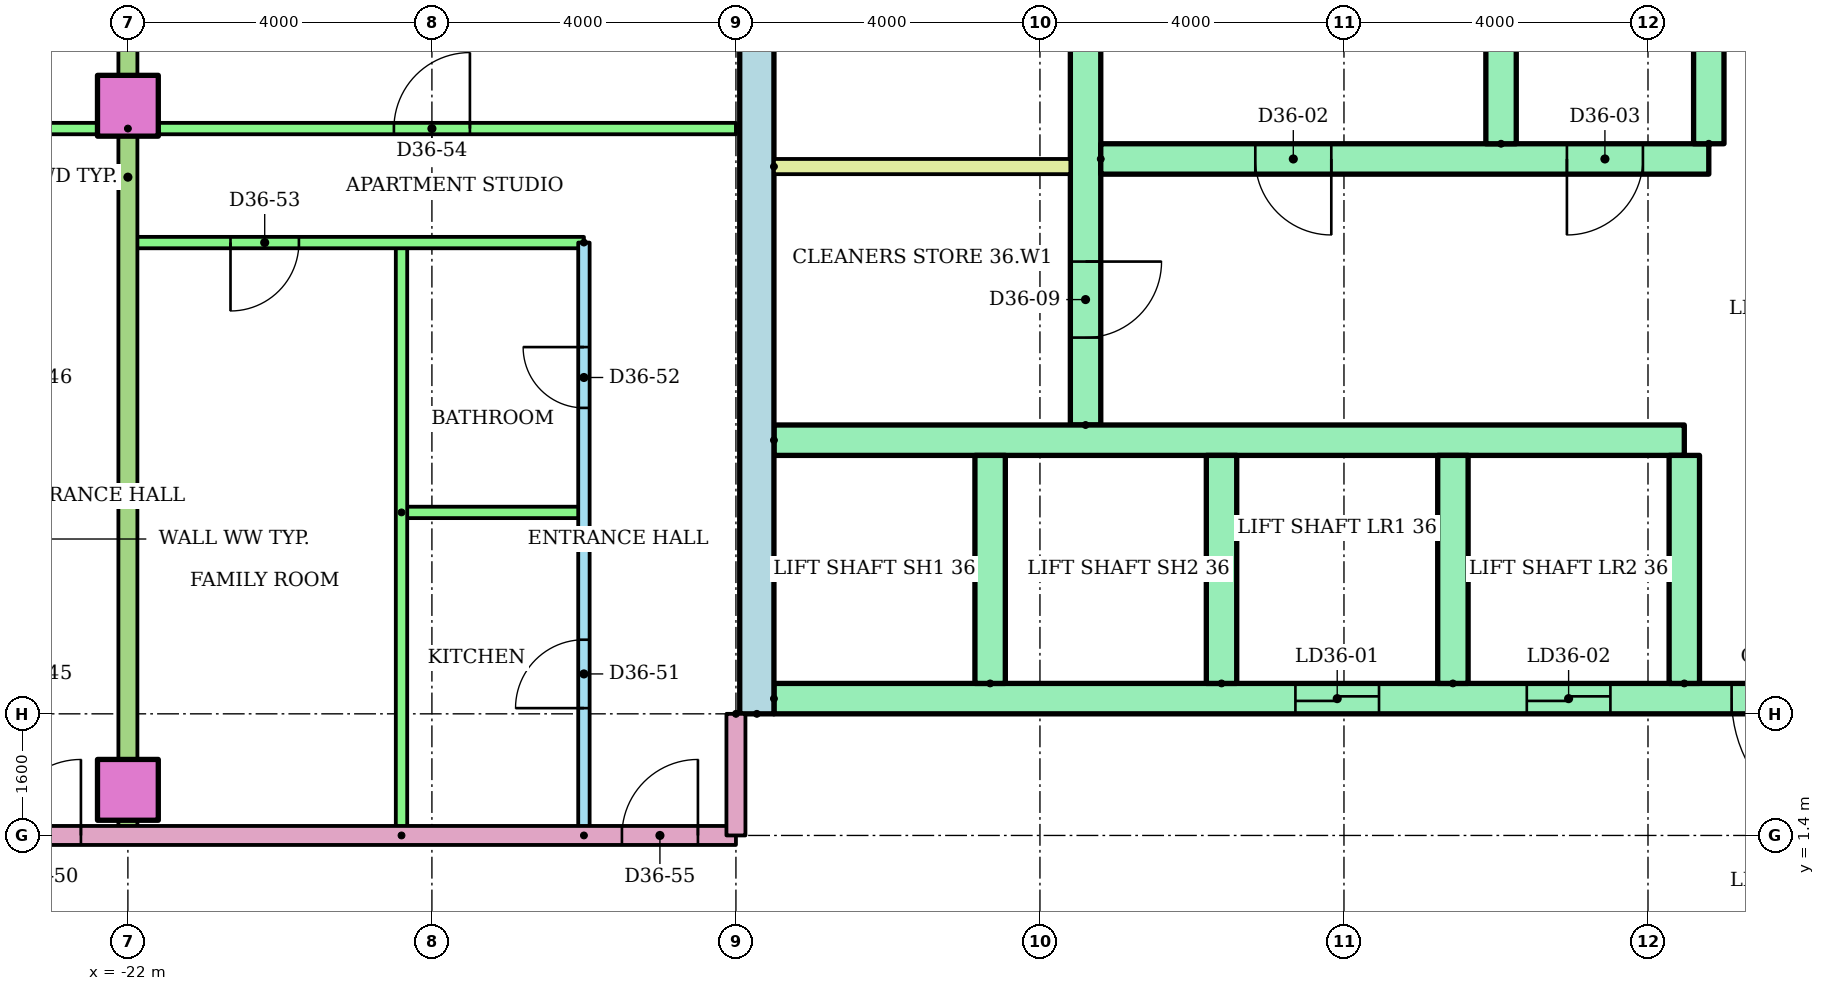
"""IFC4 building model, lengths in metres.
Left out: names, types, materials, properties, quantities, classifications, styles, units other than length and angle.
Written with IfcOpenShell. Run it as: python <this file> out.ifc"""

import sys

from ifc_helpers import new_model, si_unit, direction, frame, frame_2d, origin, origin_2d, place, context, subcontext, project, spatial, rectangle, extrude, element, fill, save


model = new_model("IFC4")
c1 = context("Model", 3, precision=1e-05, world=origin(), true_north=direction((0.0, 1.0)))
c2 = subcontext(c1, "Body", "Model", "MODEL_VIEW")
j1 = project(units=[si_unit("LENGTHUNIT", "METRE"), si_unit("PLANEANGLEUNIT", "RADIAN")], contexts=[c1])
p1 = place(None, origin())
s1 = spatial("IfcSite", under=j1, at=p1, CompositionType="ELEMENT")
p2 = place(p1, origin())
s2 = spatial("IfcBuilding", under=s1, at=p2, CompositionType="ELEMENT")
p3 = place(p2, frame((0.0, 0.0, 139.0)))
s3 = spatial("IfcBuildingStorey", under=s2, at=p3, CompositionType="ELEMENT", Elevation=139.0)
for number, where in (
    (1, (-22.0, 2.0, 0.0)),
    (2, (-22.0, 11.0, 0.0)),
):
    element("IfcColumn", number, at=place(p3, frame(where)), inside=s3, PredefinedType="COLUMN", context=c2, shape_type="SweptSolid", body=[
        extrude(rectangle(XDim=0.8, YDim=0.8, at=origin_2d()), origin(), (0.0, 0.0, 1.0), 3.2),
    ])
p4 = place(p3, frame((-13.725, 3.0, 0.0), z_axis=(0.0, 0.0, 1.0), x_axis=(0.0, 1.0, 0.0)))
e3 = element("IfcWall", 3, at=p4, inside=s3, PredefinedType="SHEAR", context=c2, shape_type="SweptSolid", body=[
    extrude(rectangle(XDim=17.0, YDim=0.45, at=frame_2d((8.5, 0.0))), origin(), (0.0, 0.0, 1.0), 2.92),
])
p5 = place(p3, frame((-9.4, 6.8, 0.0), z_axis=(0.0, 0.0, 1.0), x_axis=(0.0, 1.0, 0.0)))
e4 = element("IfcWall", 4, at=p5, inside=s3, PredefinedType="SHEAR", context=c2, shape_type="SweptSolid", body=[
    extrude(rectangle(XDim=12.7, YDim=0.4, at=frame_2d((6.35, 0.0))), origin(), (0.0, 0.0, 1.0), 2.92),
])
p6 = place(p5, frame((1.15, 0.0, 0.0)))
e5 = element("IfcOpeningElement", 5, at=p6, cuts=e4, PredefinedType="OPENING", context=c2, shape_type="SweptSolid", body=[
    extrude(rectangle(XDim=1.0, YDim=2.1, at=frame_2d((0.5, 1.05))), frame((0.0, 0.21, 0.0), z_axis=(0.0, -1.0, 0.0), x_axis=(1.0, 0.0, 0.0)), (0.0, 0.0, 1.0), 0.42),
])
p7 = place(p5, frame((7.925, 0.0, 0.0)))
e6 = element("IfcOpeningElement", 6, at=p7, cuts=e4, PredefinedType="OPENING", context=c2, shape_type="SweptSolid", body=[
    extrude(rectangle(XDim=1.0, YDim=2.1, at=frame_2d((0.5, 1.05))), frame((0.0, 0.21, 0.0), z_axis=(0.0, -1.0, 0.0), x_axis=(1.0, 0.0, 0.0)), (0.0, 0.0, 1.0), 0.42),
])
p8 = place(p3, frame((-13.5, 3.2, 0.0)))
e7 = element("IfcWall", 7, at=p8, inside=s3, PredefinedType="SHEAR", context=c2, shape_type="SweptSolid", body=[
    extrude(rectangle(XDim=27.0, YDim=0.4, at=frame_2d((13.5, 0.0))), origin(), (0.0, 0.0, 1.0), 2.92),
])
p9 = place(p8, frame((6.861, 0.0, 0.0)))
e8 = element("IfcOpeningElement", 8, at=p9, cuts=e7, PredefinedType="OPENING", context=c2, shape_type="SweptSolid", body=[
    extrude(rectangle(XDim=1.1, YDim=2.1, at=frame_2d((0.55, 1.05))), frame((0.0, 0.21, 0.0), z_axis=(0.0, -1.0, 0.0), x_axis=(1.0, 0.0, 0.0)), (0.0, 0.0, 1.0), 0.42),
])
p10 = place(p8, frame((9.906, 0.0, 0.0)))
e9 = element("IfcOpeningElement", 9, at=p10, cuts=e7, PredefinedType="OPENING", context=c2, shape_type="SweptSolid", body=[
    extrude(rectangle(XDim=1.1, YDim=2.1, at=frame_2d((0.55, 1.05))), frame((0.0, 0.21, 0.0), z_axis=(0.0, -1.0, 0.0), x_axis=(1.0, 0.0, 0.0)), (0.0, 0.0, 1.0), 0.42),
])
p11 = place(p8, frame((15.994, 0.0, 0.0)))
e10 = element("IfcOpeningElement", 10, at=p11, cuts=e7, PredefinedType="OPENING", context=c2, shape_type="SweptSolid", body=[
    extrude(rectangle(XDim=1.1, YDim=2.1, at=frame_2d((0.55, 1.05))), frame((0.0, 0.21, 0.0), z_axis=(0.0, -1.0, 0.0), x_axis=(1.0, 0.0, 0.0)), (0.0, 0.0, 1.0), 0.42),
])
p12 = place(p8, frame((19.039, 0.0, 0.0)))
e11 = element("IfcOpeningElement", 11, at=p12, cuts=e7, PredefinedType="OPENING", context=c2, shape_type="SweptSolid", body=[
    extrude(rectangle(XDim=1.1, YDim=2.1, at=frame_2d((0.55, 1.05))), frame((0.0, 0.21, 0.0), z_axis=(0.0, -1.0, 0.0), x_axis=(1.0, 0.0, 0.0)), (0.0, 0.0, 1.0), 0.42),
])
p13 = place(p8, frame((12.6, 0.0, 0.0)))
e12 = element("IfcOpeningElement", 12, at=p13, cuts=e7, PredefinedType="OPENING", context=c2, shape_type="SweptSolid", body=[
    extrude(rectangle(XDim=1.8, YDim=2.1, at=frame_2d((0.9, 1.05))), frame((0.0, 0.21, 0.0), z_axis=(0.0, -1.0, 0.0), x_axis=(1.0, 0.0, 0.0)), (0.0, 0.0, 1.0), 0.42),
])
p14 = place(p3, frame((-13.5, 6.6, 0.0)))
e13 = element("IfcWall", 13, at=p14, inside=s3, PredefinedType="SHEAR", context=c2, shape_type="SweptSolid", body=[
    extrude(rectangle(XDim=11.978, YDim=0.4, at=frame_2d((5.989, 0.0))), origin(), (0.0, 0.0, 1.0), 2.92),
])
for number, where, z_axis, x_axis in (
    (14, (-10.656, 3.4, 0.0), (0.0, 0.0, 1.0), (0.0, 1.0, 0.0)),
    (15, (-7.611, 3.4, 0.0), (0.0, 0.0, 1.0), (0.0, 1.0, 0.0)),
    (16, (-4.567, 3.4, 0.0), (0.0, 0.0, 1.0), (0.0, 1.0, 0.0)),
    (17, (-1.522, 3.4, 0.0), (0.0, 0.0, 1.0), (0.0, 1.0, 0.0)),
):
    element("IfcWall", number, at=place(p3, frame(where, z_axis=z_axis, x_axis=x_axis)), inside=s3, PredefinedType="SHEAR", context=c2, shape_type="SweptSolid", body=[
        extrude(rectangle(XDim=3.0, YDim=0.4, at=frame_2d((1.5, 0.0))), origin(), (0.0, 0.0, 1.0), 2.92),
    ])
p15 = place(p3, frame((-9.2, 10.3, 0.0)))
e18 = element("IfcWall", 18, at=p15, inside=s3, PredefinedType="SHEAR", context=c2, shape_type="SweptSolid", body=[
    extrude(rectangle(XDim=8.0, YDim=0.4, at=frame_2d((4.0, 0.0))), origin(), (0.0, 0.0, 1.0), 2.92),
])
p16 = place(p15, frame((2.033, 0.0, 0.0)))
e19 = element("IfcOpeningElement", 19, at=p16, cuts=e18, PredefinedType="OPENING", context=c2, shape_type="SweptSolid", body=[
    extrude(rectangle(XDim=1.0, YDim=2.1, at=frame_2d((0.5, 1.05))), frame((0.0, 0.21, 0.0), z_axis=(0.0, -1.0, 0.0), x_axis=(1.0, 0.0, 0.0)), (0.0, 0.0, 1.0), 0.42),
])
p17 = place(p15, frame((6.133, 0.0, 0.0)))
e20 = element("IfcOpeningElement", 20, at=p17, cuts=e18, PredefinedType="OPENING", context=c2, shape_type="SweptSolid", body=[
    extrude(rectangle(XDim=1.0, YDim=2.1, at=frame_2d((0.5, 1.05))), frame((0.0, 0.21, 0.0), z_axis=(0.0, -1.0, 0.0), x_axis=(1.0, 0.0, 0.0)), (0.0, 0.0, 1.0), 0.42),
])
for number, where, z_axis, x_axis in (
    (21, (-3.933, 10.5, 0.0), (0.0, 0.0, 1.0), (0.0, 1.0, 0.0)),
    (22, (-1.2, 10.5, 0.0), (0.0, 0.0, 1.0), (0.0, 1.0, 0.0)),
):
    element("IfcWall", number, at=place(p3, frame(where, z_axis=z_axis, x_axis=x_axis)), inside=s3, PredefinedType="SHEAR", context=c2, shape_type="SweptSolid", body=[
        extrude(rectangle(XDim=3.0, YDim=0.4, at=frame_2d((1.5, 0.0))), origin(), (0.0, 0.0, 1.0), 2.92),
    ])
p18 = place(p3, frame((-13.5, 10.2, 0.0)))
e23 = element("IfcWall", 23, at=p18, inside=s3, PredefinedType="PARTITIONING", context=c2, shape_type="SweptSolid", body=[
    extrude(rectangle(XDim=3.9, YDim=0.2, at=frame_2d((1.95, 0.0))), origin(), (0.0, 0.0, 1.0), 2.92),
])
p19 = place(p3, frame((-32.72, 10.7, 0.0)))
e24 = element("IfcWall", 24, at=p19, inside=s3, PredefinedType="PARTITIONING", context=c2, shape_type="SweptSolid", body=[
    extrude(rectangle(XDim=10.72, YDim=0.15, at=frame_2d((5.36, 0.0))), origin(), (0.0, 0.0, 1.0), 2.4),
])
p20 = place(p19, frame((1.102, 0.0, 0.0)))
e25 = element("IfcOpeningElement", 25, at=p20, cuts=e24, PredefinedType="OPENING", context=c2, shape_type="SweptSolid", body=[
    extrude(rectangle(XDim=1.0, YDim=2.1, at=frame_2d((0.5, 1.05))), frame((0.0, 0.085, 0.0), z_axis=(0.0, -1.0, 0.0), x_axis=(1.0, 0.0, 0.0)), (0.0, 0.0, 1.0), 0.17),
])
p21 = place(p19, frame((7.27, 0.0, 0.0)))
e26 = element("IfcOpeningElement", 26, at=p21, cuts=e24, PredefinedType="OPENING", context=c2, shape_type="SweptSolid", body=[
    extrude(rectangle(XDim=0.9, YDim=2.1, at=frame_2d((0.45, 1.05))), frame((0.0, 0.085, 0.0), z_axis=(0.0, -1.0, 0.0), x_axis=(1.0, 0.0, 0.0)), (0.0, 0.0, 1.0), 0.17),
])
p22 = place(p3, frame((-16.0, 1.4, 0.0), z_axis=(0.0, 0.0, 1.0), x_axis=(0.0, 1.0, 0.0)))
e27 = element("IfcWall", 27, at=p22, inside=s3, PredefinedType="PARTITIONING", context=c2, shape_type="SweptSolid", body=[
    extrude(rectangle(XDim=7.8, YDim=0.15, at=frame_2d((3.9, 0.0))), origin(), (0.0, 0.0, 1.0), 2.4),
])
p23 = place(p22, frame((1.675, 0.0, 0.0)))
e28 = element("IfcOpeningElement", 28, at=p23, cuts=e27, PredefinedType="OPENING", context=c2, shape_type="SweptSolid", body=[
    extrude(rectangle(XDim=0.9, YDim=2.1, at=frame_2d((0.45, 1.05))), frame((0.0, 0.085, 0.0), z_axis=(0.0, -1.0, 0.0), x_axis=(1.0, 0.0, 0.0)), (0.0, 0.0, 1.0), 0.17),
])
p24 = place(p22, frame((5.625, 0.0, 0.0)))
e29 = element("IfcOpeningElement", 29, at=p24, cuts=e27, PredefinedType="OPENING", context=c2, shape_type="SweptSolid", body=[
    extrude(rectangle(XDim=0.8, YDim=2.1, at=frame_2d((0.4, 1.05))), frame((0.0, 0.085, 0.0), z_axis=(0.0, -1.0, 0.0), x_axis=(1.0, 0.0, 0.0)), (0.0, 0.0, 1.0), 0.17),
])
p25 = place(p3, frame((-18.4, 5.65, 0.0)))
e30 = element("IfcWall", 30, at=p25, inside=s3, PredefinedType="PARTITIONING", context=c2, shape_type="SweptSolid", body=[
    extrude(rectangle(XDim=2.4, YDim=0.15, at=frame_2d((1.2, 0.0))), origin(), (0.0, 0.0, 1.0), 2.4),
])
p26 = place(p3, frame((-18.4, 1.4, 0.0), z_axis=(0.0, 0.0, 1.0), x_axis=(0.0, 1.0, 0.0)))
e31 = element("IfcWall", 31, at=p26, inside=s3, PredefinedType="PARTITIONING", context=c2, shape_type="SweptSolid", body=[
    extrude(rectangle(XDim=7.8, YDim=0.15, at=frame_2d((3.9, 0.0))), origin(), (0.0, 0.0, 1.0), 2.4),
])
p27 = place(p3, frame((-16.0, 9.2, 0.0), z_axis=(0.0, 0.0, 1.0), x_axis=(-1.0, 0.0, 0.0)))
e32 = element("IfcWall", 32, at=p27, inside=s3, PredefinedType="PARTITIONING", context=c2, shape_type="SweptSolid", body=[
    extrude(rectangle(XDim=6.0, YDim=0.15, at=frame_2d((3.0, 0.0))), origin(), (0.0, 0.0, 1.0), 2.4),
])
p28 = place(p27, frame((3.75, 0.0, 0.0)))
e33 = element("IfcOpeningElement", 33, at=p28, cuts=e32, PredefinedType="OPENING", context=c2, shape_type="SweptSolid", body=[
    extrude(rectangle(XDim=0.9, YDim=2.1, at=frame_2d((0.45, 1.05))), frame((0.0, 0.085, 0.0), z_axis=(0.0, -1.0, 0.0), x_axis=(1.0, 0.0, 0.0)), (0.0, 0.0, 1.0), 0.17),
])
p29 = place(p3, frame((-22.0, 10.7, 0.0)))
e34 = element("IfcWall", 34, at=p29, inside=s3, PredefinedType="PARTITIONING", context=c2, shape_type="SweptSolid", body=[
    extrude(rectangle(XDim=8.0, YDim=0.15, at=frame_2d((4.0, 0.0))), origin(), (0.0, 0.0, 1.0), 2.4),
])
p30 = place(p29, frame((3.5, 0.0, 0.0)))
e35 = element("IfcOpeningElement", 35, at=p30, cuts=e34, PredefinedType="OPENING", context=c2, shape_type="SweptSolid", body=[
    extrude(rectangle(XDim=1.0, YDim=2.1, at=frame_2d((0.5, 1.05))), frame((0.0, 0.085, 0.0), z_axis=(0.0, -1.0, 0.0), x_axis=(1.0, 0.0, 0.0)), (0.0, 0.0, 1.0), 0.17),
])
p31 = place(p3, frame((-22.0, 18.721, 0.0), z_axis=(0.0, 0.0, 1.0), x_axis=(0.0, -1.0, 0.0)))
e36 = element("IfcWall", 36, at=p31, inside=s3, PredefinedType="PARTITIONING", context=c2, shape_type="SweptSolid", body=[
    extrude(rectangle(XDim=17.321, YDim=0.25, at=frame_2d((8.661, 0.0))), origin(), (0.0, 0.0, 1.0), 2.4),
])
p32 = place(p3, frame((-29.0, 1.4, 0.0)))
e37 = element("IfcWall", 37, at=p32, inside=s3, PredefinedType="PARTITIONING", context=c2, shape_type="SweptSolid", body=[
    extrude(rectangle(XDim=15.0, YDim=0.25, at=frame_2d((7.5, 0.0))), origin(), (0.0, 0.0, 1.0), 2.4),
])
p33 = place(p32, frame((5.382, 0.0, 0.0)))
e38 = element("IfcOpeningElement", 38, at=p33, cuts=e37, PredefinedType="OPENING", context=c2, shape_type="SweptSolid", body=[
    extrude(rectangle(XDim=1.0, YDim=2.1, at=frame_2d((0.5, 1.05))), frame((0.0, 0.135, 0.0), z_axis=(0.0, -1.0, 0.0), x_axis=(1.0, 0.0, 0.0)), (0.0, 0.0, 1.0), 0.27),
])
p34 = place(p32, frame((13.5, 0.0, 0.0)))
e39 = element("IfcOpeningElement", 39, at=p34, cuts=e37, PredefinedType="OPENING", context=c2, shape_type="SweptSolid", body=[
    extrude(rectangle(XDim=1.0, YDim=2.1, at=frame_2d((0.5, 1.05))), frame((0.0, 0.135, 0.0), z_axis=(0.0, -1.0, 0.0), x_axis=(1.0, 0.0, 0.0)), (0.0, 0.0, 1.0), 0.27),
])
p35 = place(p3, frame((-14.0, 3.0, 0.0), z_axis=(0.0, 0.0, 1.0), x_axis=(0.0, -1.0, 0.0)))
e40 = element("IfcWall", 40, at=p35, inside=s3, PredefinedType="PARTITIONING", context=c2, shape_type="SweptSolid", body=[
    extrude(rectangle(XDim=1.6, YDim=0.25, at=frame_2d((0.8, 0.0))), origin(), (0.0, 0.0, 1.0), 2.4),
])
p36 = place(p9, origin())
e41 = element("IfcDoor", 41, at=p36, inside=s3, OperationType="SLIDING_TO_LEFT", PredefinedType="DOOR", context=c2, shape_type="SweptSolid", body=[
    extrude(rectangle(XDim=1.1, YDim=2.1, at=frame_2d((0.55, 1.05))), frame((0.0, 0.025, 0.0), z_axis=(0.0, -1.0, 0.0), x_axis=(1.0, 0.0, 0.0)), (0.0, 0.0, 1.0), 0.05),
])
fill(e8, e41)
p37 = place(p10, origin())
e42 = element("IfcDoor", 42, at=p37, inside=s3, OperationType="SLIDING_TO_LEFT", PredefinedType="DOOR", context=c2, shape_type="SweptSolid", body=[
    extrude(rectangle(XDim=1.1, YDim=2.1, at=frame_2d((0.55, 1.05))), frame((0.0, 0.025, 0.0), z_axis=(0.0, -1.0, 0.0), x_axis=(1.0, 0.0, 0.0)), (0.0, 0.0, 1.0), 0.05),
])
fill(e9, e42)
p38 = place(p13, frame((1.8, 0.0, 0.0), z_axis=(0.0, 0.0, 1.0), x_axis=(-1.0, 0.0, 0.0)))
e43 = element("IfcDoor", 43, at=p38, inside=s3, OperationType="DOUBLE_DOOR_SINGLE_SWING", PredefinedType="DOOR", context=c2, shape_type="SweptSolid", body=[
    extrude(rectangle(XDim=1.8, YDim=2.1, at=frame_2d((0.9, 1.05))), frame((0.0, 0.025, 0.0), z_axis=(0.0, -1.0, 0.0), x_axis=(1.0, 0.0, 0.0)), (0.0, 0.0, 1.0), 0.05),
])
fill(e12, e43)
p39 = place(p16, frame((1.0, 0.0, 0.0), z_axis=(0.0, 0.0, 1.0), x_axis=(-1.0, 0.0, 0.0)))
e44 = element("IfcDoor", 44, at=p39, inside=s3, OperationType="SINGLE_SWING_RIGHT", PredefinedType="DOOR", context=c2, shape_type="SweptSolid", body=[
    extrude(rectangle(XDim=1.0, YDim=2.1, at=frame_2d((0.5, 1.05))), frame((0.0, 0.025, 0.0), z_axis=(0.0, -1.0, 0.0), x_axis=(1.0, 0.0, 0.0)), (0.0, 0.0, 1.0), 0.05),
])
fill(e19, e44)
p40 = place(p17, frame((1.0, 0.0, 0.0), z_axis=(0.0, 0.0, 1.0), x_axis=(-1.0, 0.0, 0.0)))
e45 = element("IfcDoor", 45, at=p40, inside=s3, OperationType="SINGLE_SWING_LEFT", PredefinedType="DOOR", context=c2, shape_type="SweptSolid", body=[
    extrude(rectangle(XDim=1.0, YDim=2.1, at=frame_2d((0.5, 1.05))), frame((0.0, 0.025, 0.0), z_axis=(0.0, -1.0, 0.0), x_axis=(1.0, 0.0, 0.0)), (0.0, 0.0, 1.0), 0.05),
])
fill(e20, e45)
p41 = place(p6, frame((1.0, 0.0, 0.0), z_axis=(0.0, 0.0, 1.0), x_axis=(-1.0, 0.0, 0.0)))
e46 = element("IfcDoor", 46, at=p41, inside=s3, OperationType="SINGLE_SWING_RIGHT", PredefinedType="DOOR", context=c2, shape_type="SweptSolid", body=[
    extrude(rectangle(XDim=1.0, YDim=2.1, at=frame_2d((0.5, 1.05))), frame((0.0, 0.025, 0.0), z_axis=(0.0, -1.0, 0.0), x_axis=(1.0, 0.0, 0.0)), (0.0, 0.0, 1.0), 0.05),
])
fill(e5, e46)
p42 = place(p33, origin())
e47 = element("IfcDoor", 47, at=p42, inside=s3, OperationType="SINGLE_SWING_RIGHT", PredefinedType="DOOR", context=c2, shape_type="SweptSolid", body=[
    extrude(rectangle(XDim=1.0, YDim=2.1, at=frame_2d((0.5, 1.05))), frame((0.0, 0.025, 0.0), z_axis=(0.0, -1.0, 0.0), x_axis=(1.0, 0.0, 0.0)), (0.0, 0.0, 1.0), 0.05),
])
fill(e38, e47)
p43 = place(p23, origin())
e48 = element("IfcDoor", 48, at=p43, inside=s3, OperationType="SINGLE_SWING_LEFT", PredefinedType="DOOR", context=c2, shape_type="SweptSolid", body=[
    extrude(rectangle(XDim=0.9, YDim=2.1, at=frame_2d((0.45, 1.05))), frame((0.0, 0.025, 0.0), z_axis=(0.0, -1.0, 0.0), x_axis=(1.0, 0.0, 0.0)), (0.0, 0.0, 1.0), 0.05),
])
fill(e28, e48)
p44 = place(p24, origin())
e49 = element("IfcDoor", 49, at=p44, inside=s3, OperationType="SINGLE_SWING_RIGHT", PredefinedType="DOOR", context=c2, shape_type="SweptSolid", body=[
    extrude(rectangle(XDim=0.8, YDim=2.1, at=frame_2d((0.4, 1.05))), frame((0.0, 0.025, 0.0), z_axis=(0.0, -1.0, 0.0), x_axis=(1.0, 0.0, 0.0)), (0.0, 0.0, 1.0), 0.05),
])
fill(e29, e49)
p45 = place(p28, origin())
e50 = element("IfcDoor", 50, at=p45, inside=s3, OperationType="SINGLE_SWING_RIGHT", PredefinedType="DOOR", context=c2, shape_type="SweptSolid", body=[
    extrude(rectangle(XDim=0.9, YDim=2.1, at=frame_2d((0.45, 1.05))), frame((0.0, 0.025, 0.0), z_axis=(0.0, -1.0, 0.0), x_axis=(1.0, 0.0, 0.0)), (0.0, 0.0, 1.0), 0.05),
])
fill(e33, e50)
p46 = place(p30, origin())
e51 = element("IfcDoor", 51, at=p46, inside=s3, OperationType="SINGLE_SWING_RIGHT", PredefinedType="DOOR", context=c2, shape_type="SweptSolid", body=[
    extrude(rectangle(XDim=1.0, YDim=2.1, at=frame_2d((0.5, 1.05))), frame((0.0, 0.025, 0.0), z_axis=(0.0, -1.0, 0.0), x_axis=(1.0, 0.0, 0.0)), (0.0, 0.0, 1.0), 0.05),
])
fill(e35, e51)
p47 = place(p34, origin())
e52 = element("IfcDoor", 52, at=p47, inside=s3, OperationType="SINGLE_SWING_RIGHT", PredefinedType="DOOR", context=c2, shape_type="SweptSolid", body=[
    extrude(rectangle(XDim=1.0, YDim=2.1, at=frame_2d((0.5, 1.05))), frame((0.0, 0.025, 0.0), z_axis=(0.0, -1.0, 0.0), x_axis=(1.0, 0.0, 0.0)), (0.0, 0.0, 1.0), 0.05),
])
fill(e39, e52)
save(model, sys.argv[1])
